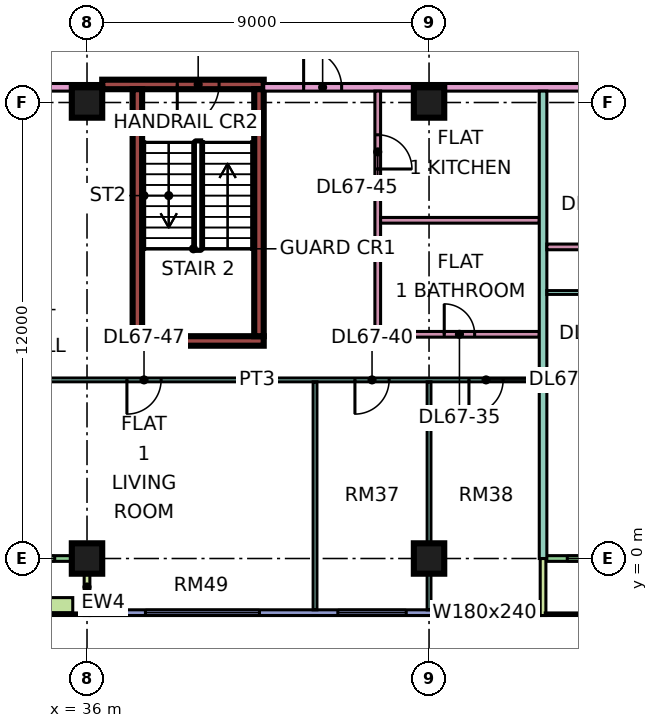
"""IFC4 building model, lengths in metres.
Left out: names, types, materials, properties, quantities, classifications, styles, units other than length and angle.
Written with IfcOpenShell. Run it as: python <this file> out.ifc"""

import sys

from ifc_helpers import new_model, si_unit, direction, frame, frame_2d, origin, origin_2d, place, context, subcontext, project, spatial, rectangle, extrude, element, fill, save


model = new_model("IFC4")
c1 = context("Model", 3, precision=1e-05, world=origin(), true_north=direction((0.0, 1.0)))
c2 = subcontext(c1, "Body", "Model", "MODEL_VIEW")
j1 = project(units=[si_unit("LENGTHUNIT", "METRE"), si_unit("PLANEANGLEUNIT", "RADIAN")], contexts=[c1])
p1 = place(None, origin())
s1 = spatial("IfcSite", under=j1, at=p1, CompositionType="ELEMENT")
p2 = place(p1, origin())
s2 = spatial("IfcBuilding", under=s1, at=p2, CompositionType="ELEMENT")
p3 = place(p2, frame((0.0, 0.0, 288.4)))
s3 = spatial("IfcBuildingStorey", under=s2, at=p3, CompositionType="ELEMENT", Elevation=288.4)
for number, where, z_axis, x_axis in (
    (1, (36.0, 0.0, 0.0), (0.0, 0.0, 1.0), (1.0, 0.0, 0.0)),
    (2, (36.0, 12.0, 0.0), (0.0, 0.0, 1.0), (1.0, 0.0, 0.0)),
    (3, (45.0, 0.0, 0.0), (0.0, 0.0, 1.0), (1.0, 0.0, 0.0)),
    (4, (45.0, 12.0, 0.0), (0.0, 0.0, 1.0), (1.0, 0.0, 0.0)),
):
    element("IfcColumn", number, at=place(p3, frame(where, z_axis=z_axis, x_axis=x_axis)), inside=s3, PredefinedType="COLUMN", context=c2, shape_type="SweptSolid", body=[
        extrude(rectangle(XDim=0.8, YDim=0.8, at=origin_2d()), origin(), (0.0, 0.0, 1.0), 3.75),
    ])
p4 = place(p3, frame((37.2, 5.725, 0.0), z_axis=(0.0, 0.0, 1.0), x_axis=(1.0, 0.0, 0.0)))
e5 = element("IfcWall", 5, at=p4, inside=s3, PredefinedType="SHEAR", context=c2, shape_type="SweptSolid", body=[
    extrude(rectangle(XDim=3.45, YDim=0.25, at=frame_2d((1.725, 0.0))), origin(), (0.0, 0.0, 1.0), 3.75),
])
p5 = place(p3, frame((36.4, 12.475, 0.0), z_axis=(0.0, 0.0, 1.0), x_axis=(1.0, 0.0, 0.0)))
e6 = element("IfcWall", 6, at=p5, inside=s3, PredefinedType="SHEAR", context=c2, shape_type="SweptSolid", body=[
    extrude(rectangle(XDim=4.25, YDim=0.25, at=frame_2d((2.125, 0.0))), origin(), (0.0, 0.0, 1.0), 3.75),
])
p6 = place(p5, frame((1.975, 0.0, 0.0)))
e7 = element("IfcOpeningElement", 7, at=p6, cuts=e6, PredefinedType="OPENING", context=c2, shape_type="SweptSolid", body=[
    extrude(rectangle(XDim=1.1, YDim=2.2, at=frame_2d((0.55, 1.1))), frame((0.0, 0.135, 0.0), z_axis=(0.0, -1.0, 0.0), x_axis=(1.0, 0.0, 0.0)), (0.0, 0.0, 1.0), 0.27),
])
for number, where, z_axis, x_axis in (
    (8, (37.325, 5.85, 0.0), (0.0, 0.0, 1.0), (0.0, 1.0, 0.0)),
    (9, (40.525, 5.85, 0.0), (0.0, 0.0, 1.0), (0.0, 1.0, 0.0)),
):
    element("IfcWall", number, at=place(p3, frame(where, z_axis=z_axis, x_axis=x_axis)), inside=s3, PredefinedType="SHEAR", context=c2, shape_type="SweptSolid", body=[
        extrude(rectangle(XDim=6.5, YDim=0.25, at=frame_2d((3.25, 0.0))), origin(), (0.0, 0.0, 1.0), 3.75),
    ])
p7 = place(p3, frame((24.075, 0.0, 0.0), z_axis=(0.0, 0.0, 1.0), x_axis=(1.0, 0.0, 0.0)))
e10 = element("IfcWall", 10, at=p7, inside=s3, PredefinedType="SOLIDWALL", context=c2, shape_type="SweptSolid", body=[
    extrude(rectangle(XDim=11.85, YDim=0.15, at=frame_2d((5.925, 0.0))), origin(), (0.0, 0.0, 1.0), 3.35),
])
p8 = place(p7, frame((0.775, 0.0, 0.45)))
e11 = element("IfcOpeningElement", 11, at=p8, cuts=e10, PredefinedType="OPENING", context=c2, shape_type="SweptSolid", body=[
    extrude(rectangle(XDim=1.8, YDim=2.4, at=frame_2d((0.9, 1.2))), frame((0.0, 0.085, 0.0), z_axis=(0.0, -1.0, 0.0), x_axis=(1.0, 0.0, 0.0)), (0.0, 0.0, 1.0), 0.17),
])
p9 = place(p7, frame((3.525, 0.0, 0.0)))
e12 = element("IfcOpeningElement", 12, at=p9, cuts=e10, PredefinedType="OPENING", context=c2, shape_type="SweptSolid", body=[
    extrude(rectangle(XDim=1.8, YDim=2.4, at=frame_2d((0.9, 1.2))), frame((0.0, 0.085, 0.0), z_axis=(0.0, -1.0, 0.0), x_axis=(1.0, 0.0, 0.0)), (0.0, 0.0, 1.0), 0.17),
])
p10 = place(p7, frame((6.525, 0.0, 0.45)))
e13 = element("IfcOpeningElement", 13, at=p10, cuts=e10, PredefinedType="OPENING", context=c2, shape_type="SweptSolid", body=[
    extrude(rectangle(XDim=1.8, YDim=2.4, at=frame_2d((0.9, 1.2))), frame((0.0, 0.085, 0.0), z_axis=(0.0, -1.0, 0.0), x_axis=(1.0, 0.0, 0.0)), (0.0, 0.0, 1.0), 0.17),
])
p11 = place(p7, frame((9.275, 0.0, 0.45)))
e14 = element("IfcOpeningElement", 14, at=p11, cuts=e10, PredefinedType="OPENING", context=c2, shape_type="SweptSolid", body=[
    extrude(rectangle(XDim=1.8, YDim=2.4, at=frame_2d((0.9, 1.2))), frame((0.0, 0.085, 0.0), z_axis=(0.0, -1.0, 0.0), x_axis=(1.0, 0.0, 0.0)), (0.0, 0.0, 1.0), 0.17),
])
p12 = place(p3, frame((36.0, -1.5, 0.0), z_axis=(0.0, 0.0, 1.0), x_axis=(0.0, 1.0, 0.0)))
e15 = element("IfcWall", 15, at=p12, inside=s3, PredefinedType="SOLIDWALL", context=c2, shape_type="SweptSolid", body=[
    extrude(rectangle(XDim=1.5, YDim=0.15, at=frame_2d((0.75, 0.0))), origin(), (0.0, 0.0, 1.0), 3.35),
])
p13 = place(p3, frame((36.075, -1.425, 0.0), z_axis=(0.0, 0.0, 1.0), x_axis=(1.0, 0.0, 0.0)))
e16 = element("IfcWall", 16, at=p13, inside=s3, PredefinedType="SOLIDWALL", context=c2, shape_type="SweptSolid", body=[
    extrude(rectangle(XDim=11.85, YDim=0.15, at=frame_2d((5.925, 0.0))), origin(), (0.0, 0.0, 1.0), 3.35),
])
p14 = place(p13, frame((1.462, 0.0, 0.45)))
e17 = element("IfcOpeningElement", 17, at=p14, cuts=e16, PredefinedType="OPENING", context=c2, shape_type="SweptSolid", body=[
    extrude(rectangle(XDim=3.0, YDim=2.4, at=frame_2d((1.5, 1.2))), frame((0.0, 0.085, 0.0), z_axis=(0.0, -1.0, 0.0), x_axis=(1.0, 0.0, 0.0)), (0.0, 0.0, 1.0), 0.17),
])
p15 = place(p13, frame((6.525, 0.0, 0.45)))
e18 = element("IfcOpeningElement", 18, at=p15, cuts=e16, PredefinedType="OPENING", context=c2, shape_type="SweptSolid", body=[
    extrude(rectangle(XDim=1.8, YDim=2.4, at=frame_2d((0.9, 1.2))), frame((0.0, 0.085, 0.0), z_axis=(0.0, -1.0, 0.0), x_axis=(1.0, 0.0, 0.0)), (0.0, 0.0, 1.0), 0.17),
])
p16 = place(p13, frame((9.488, 0.0, 0.45)))
e19 = element("IfcOpeningElement", 19, at=p16, cuts=e16, PredefinedType="OPENING", context=c2, shape_type="SweptSolid", body=[
    extrude(rectangle(XDim=1.8, YDim=2.4, at=frame_2d((0.9, 1.2))), frame((0.0, 0.085, 0.0), z_axis=(0.0, -1.0, 0.0), x_axis=(1.0, 0.0, 0.0)), (0.0, 0.0, 1.0), 0.17),
])
p17 = place(p3, frame((48.075, 0.0, 0.0), z_axis=(0.0, 0.0, 1.0), x_axis=(1.0, 0.0, 0.0)))
e20 = element("IfcWall", 20, at=p17, inside=s3, PredefinedType="SOLIDWALL", context=c2, shape_type="SweptSolid", body=[
    extrude(rectangle(XDim=13.35, YDim=0.15, at=frame_2d((6.675, 0.0))), origin(), (0.0, 0.0, 1.0), 3.35),
])
p18 = place(p17, frame((0.562, 0.0, 0.45)))
e21 = element("IfcOpeningElement", 21, at=p18, cuts=e20, PredefinedType="OPENING", context=c2, shape_type="SweptSolid", body=[
    extrude(rectangle(XDim=1.8, YDim=2.4, at=frame_2d((0.9, 1.2))), frame((0.0, 0.085, 0.0), z_axis=(0.0, -1.0, 0.0), x_axis=(1.0, 0.0, 0.0)), (0.0, 0.0, 1.0), 0.17),
])
p19 = place(p17, frame((3.275, 0.0, 0.45)))
e22 = element("IfcOpeningElement", 22, at=p19, cuts=e20, PredefinedType="OPENING", context=c2, shape_type="SweptSolid", body=[
    extrude(rectangle(XDim=1.8, YDim=2.4, at=frame_2d((0.9, 1.2))), frame((0.0, 0.085, 0.0), z_axis=(0.0, -1.0, 0.0), x_axis=(1.0, 0.0, 0.0)), (0.0, 0.0, 1.0), 0.17),
])
p20 = place(p17, frame((8.275, 0.0, 0.0)))
e23 = element("IfcOpeningElement", 23, at=p20, cuts=e20, PredefinedType="OPENING", context=c2, shape_type="SweptSolid", body=[
    extrude(rectangle(XDim=1.8, YDim=2.4, at=frame_2d((0.9, 1.2))), frame((0.0, 0.085, 0.0), z_axis=(0.0, -1.0, 0.0), x_axis=(1.0, 0.0, 0.0)), (0.0, 0.0, 1.0), 0.17),
])
p21 = place(p17, frame((12.188, 0.0, 0.45)))
e24 = element("IfcOpeningElement", 24, at=p21, cuts=e20, PredefinedType="OPENING", context=c2, shape_type="SweptSolid", body=[
    extrude(rectangle(XDim=0.9, YDim=2.4, at=frame_2d((0.45, 1.2))), frame((0.0, 0.085, 0.0), z_axis=(0.0, -1.0, 0.0), x_axis=(1.0, 0.0, 0.0)), (0.0, 0.0, 1.0), 0.17),
])
p22 = place(p3, frame((48.0, -1.5, 0.0), z_axis=(0.0, 0.0, 1.0), x_axis=(0.0, 1.0, 0.0)))
e25 = element("IfcWall", 25, at=p22, inside=s3, PredefinedType="SOLIDWALL", context=c2, shape_type="SweptSolid", body=[
    extrude(rectangle(XDim=1.5, YDim=0.15, at=frame_2d((0.75, 0.0))), origin(), (0.0, 0.0, 1.0), 3.35),
])
p23 = place(p3, frame((24.375, -1.229, 0.0), z_axis=(0.0, 0.0, 1.0), x_axis=(1.0, 0.0, 0.0)))
e26 = element("IfcWall", 26, at=p23, inside=s3, PredefinedType="SOLIDWALL", context=c2, shape_type="SweptSolid", body=[
    extrude(rectangle(XDim=11.25, YDim=0.4, at=frame_2d((5.625, 0.0))), origin(), (0.0, 0.0, 1.0), 0.7),
])
p24 = place(p3, frame((33.05, 4.7, 0.0), z_axis=(0.0, 0.0, 1.0), x_axis=(1.0, 0.0, 0.0)))
e27 = element("IfcWall", 27, at=p24, inside=s3, PredefinedType="PARTITIONING", context=c2, shape_type="SweptSolid", body=[
    extrude(rectangle(XDim=14.85, YDim=0.1, at=frame_2d((7.425, 0.0))), origin(), (0.0, 0.0, 1.0), 3.35),
])
p25 = place(p24, frame((10.0, 0.0, 0.0)))
e28 = element("IfcOpeningElement", 28, at=p25, cuts=e27, PredefinedType="OPENING", context=c2, shape_type="SweptSolid", body=[
    extrude(rectangle(XDim=0.9, YDim=2.1, at=frame_2d((0.45, 1.05))), frame((0.0, 0.06, 0.0), z_axis=(0.0, -1.0, 0.0), x_axis=(1.0, 0.0, 0.0)), (0.0, 0.0, 1.0), 0.12),
])
p26 = place(p24, frame((13.0, 0.0, 0.0)))
e29 = element("IfcOpeningElement", 29, at=p26, cuts=e27, PredefinedType="OPENING", context=c2, shape_type="SweptSolid", body=[
    extrude(rectangle(XDim=0.9, YDim=2.1, at=frame_2d((0.45, 1.05))), frame((0.0, 0.06, 0.0), z_axis=(0.0, -1.0, 0.0), x_axis=(1.0, 0.0, 0.0)), (0.0, 0.0, 1.0), 0.12),
])
p27 = place(p24, frame((4.0, 0.0, 0.0)))
e30 = element("IfcOpeningElement", 30, at=p27, cuts=e27, PredefinedType="OPENING", context=c2, shape_type="SweptSolid", body=[
    extrude(rectangle(XDim=0.9, YDim=2.1, at=frame_2d((0.45, 1.05))), frame((0.0, 0.06, 0.0), z_axis=(0.0, -1.0, 0.0), x_axis=(1.0, 0.0, 0.0)), (0.0, 0.0, 1.0), 0.12),
])
p28 = place(p3, frame((34.0, 12.4, 0.0), z_axis=(0.0, 0.0, 1.0), x_axis=(1.0, 0.0, 0.0)))
e31 = element("IfcWall", 31, at=p28, inside=s3, PredefinedType="PARTITIONING", context=c2, shape_type="SweptSolid", body=[
    extrude(rectangle(XDim=2.401, YDim=0.2, at=frame_2d((1.2, 0.0))), origin(), (0.0, 0.0, 1.0), 3.35),
])
p29 = place(p3, frame((40.65, 12.4, 0.0), z_axis=(0.0, 0.0, 1.0), x_axis=(1.0, 0.0, 0.0)))
e32 = element("IfcWall", 32, at=p29, inside=s3, PredefinedType="PARTITIONING", context=c2, shape_type="SweptSolid", body=[
    extrude(rectangle(XDim=22.35, YDim=0.2, at=frame_2d((11.175, 0.0))), origin(), (0.0, 0.0, 1.0), 3.35),
])
p30 = place(p29, frame((20.25, 0.0, 0.0)))
e33 = element("IfcOpeningElement", 33, at=p30, cuts=e32, PredefinedType="OPENING", context=c2, shape_type="SweptSolid", body=[
    extrude(rectangle(XDim=1.0, YDim=2.1, at=frame_2d((0.5, 1.05))), frame((0.0, 0.11, 0.0), z_axis=(0.0, -1.0, 0.0), x_axis=(1.0, 0.0, 0.0)), (0.0, 0.0, 1.0), 0.22),
])
p31 = place(p29, frame((1.05, 0.0, 0.0)))
e34 = element("IfcOpeningElement", 34, at=p31, cuts=e32, PredefinedType="OPENING", context=c2, shape_type="SweptSolid", body=[
    extrude(rectangle(XDim=1.0, YDim=2.1, at=frame_2d((0.5, 1.05))), frame((0.0, 0.11, 0.0), z_axis=(0.0, -1.0, 0.0), x_axis=(1.0, 0.0, 0.0)), (0.0, 0.0, 1.0), 0.22),
])
p32 = place(p3, frame((42.0, -1.35, 0.0), z_axis=(0.0, 0.0, 1.0), x_axis=(0.0, 1.0, 0.0)))
e35 = element("IfcWall", 35, at=p32, inside=s3, PredefinedType="PARTITIONING", context=c2, shape_type="SweptSolid", body=[
    extrude(rectangle(XDim=6.0, YDim=0.1, at=frame_2d((3.0, 0.0))), origin(), (0.0, 0.0, 1.0), 3.35),
])
p33 = place(p3, frame((43.65, 5.825, 0.0), z_axis=(0.0, 0.0, 1.0), x_axis=(0.0, 1.0, 0.0)))
e36 = element("IfcWall", 36, at=p33, inside=s3, PredefinedType="PARTITIONING", context=c2, shape_type="SweptSolid", body=[
    extrude(rectangle(XDim=6.475, YDim=0.15, at=frame_2d((3.238, 0.0))), origin(), (0.0, 0.0, 1.0), 3.35),
])
p34 = place(p33, frame((4.425, 0.0, 0.0)))
e37 = element("IfcOpeningElement", 37, at=p34, cuts=e36, PredefinedType="OPENING", context=c2, shape_type="SweptSolid", body=[
    extrude(rectangle(XDim=0.9, YDim=2.1, at=frame_2d((0.45, 1.05))), frame((0.0, 0.085, 0.0), z_axis=(0.0, -1.0, 0.0), x_axis=(1.0, 0.0, 0.0)), (0.0, 0.0, 1.0), 0.17),
])
p35 = place(p3, frame((43.725, 5.9, 0.0), z_axis=(0.0, 0.0, 1.0), x_axis=(1.0, 0.0, 0.0)))
e38 = element("IfcWall", 38, at=p35, inside=s3, PredefinedType="PARTITIONING", context=c2, shape_type="SweptSolid", body=[
    extrude(rectangle(XDim=4.175, YDim=0.15, at=frame_2d((2.087, 0.0))), origin(), (0.0, 0.0, 1.0), 3.35),
])
p36 = place(p35, frame((1.675, 0.0, 0.0)))
e39 = element("IfcOpeningElement", 39, at=p36, cuts=e38, PredefinedType="OPENING", context=c2, shape_type="SweptSolid", body=[
    extrude(rectangle(XDim=0.8, YDim=2.1, at=frame_2d((0.4, 1.05))), frame((0.0, 0.085, 0.0), z_axis=(0.0, -1.0, 0.0), x_axis=(1.0, 0.0, 0.0)), (0.0, 0.0, 1.0), 0.17),
])
p37 = place(p3, frame((43.725, 8.9, 0.0), z_axis=(0.0, 0.0, 1.0), x_axis=(1.0, 0.0, 0.0)))
e40 = element("IfcWall", 40, at=p37, inside=s3, PredefinedType="PARTITIONING", context=c2, shape_type="SweptSolid", body=[
    extrude(rectangle(XDim=4.175, YDim=0.15, at=frame_2d((2.087, 0.0))), origin(), (0.0, 0.0, 1.0), 3.35),
])
p38 = place(p3, frame((45.0, -1.351, 0.0), z_axis=(0.0, 0.0, 1.0), x_axis=(0.0, 1.0, 0.0)))
e41 = element("IfcWall", 41, at=p38, inside=s3, PredefinedType="PARTITIONING", context=c2, shape_type="SweptSolid", body=[
    extrude(rectangle(XDim=6.001, YDim=0.1, at=frame_2d((3.0, 0.0))), origin(), (0.0, 0.0, 1.0), 3.35),
])
p39 = place(p3, frame((48.0, 0.0, 0.0), z_axis=(0.0, 0.0, 1.0), x_axis=(0.0, 1.0, 0.0)))
e42 = element("IfcWall", 42, at=p39, inside=s3, PredefinedType="PARTITIONING", context=c2, shape_type="SweptSolid", body=[
    extrude(rectangle(XDim=12.3, YDim=0.2, at=frame_2d((6.15, 0.0))), origin(), (0.0, 0.0, 1.0), 3.35),
])
p40 = place(p3, frame((48.1, 7.0, 0.0), z_axis=(0.0, 0.0, 1.0), x_axis=(1.0, 0.0, 0.0)))
e43 = element("IfcWall", 43, at=p40, inside=s3, PredefinedType="PARTITIONING", context=c2, shape_type="SweptSolid", body=[
    extrude(rectangle(XDim=5.85, YDim=0.1, at=frame_2d((2.925, 0.0))), origin(), (0.0, 0.0, 1.0), 3.35),
])
p41 = place(p40, frame((0.95, 0.0, 0.0)))
e44 = element("IfcOpeningElement", 44, at=p41, cuts=e43, PredefinedType="OPENING", context=c2, shape_type="SweptSolid", body=[
    extrude(rectangle(XDim=0.9, YDim=2.1, at=frame_2d((0.45, 1.05))), frame((0.0, 0.06, 0.0), z_axis=(0.0, -1.0, 0.0), x_axis=(1.0, 0.0, 0.0)), (0.0, 0.0, 1.0), 0.12),
])
p42 = place(p40, frame((3.95, 0.0, 0.0)))
e45 = element("IfcOpeningElement", 45, at=p42, cuts=e43, PredefinedType="OPENING", context=c2, shape_type="SweptSolid", body=[
    extrude(rectangle(XDim=0.9, YDim=2.1, at=frame_2d((0.45, 1.05))), frame((0.0, 0.06, 0.0), z_axis=(0.0, -1.0, 0.0), x_axis=(1.0, 0.0, 0.0)), (0.0, 0.0, 1.0), 0.12),
])
p43 = place(p3, frame((48.1, 8.2, 0.0), z_axis=(0.0, 0.0, 1.0), x_axis=(1.0, 0.0, 0.0)))
e46 = element("IfcWall", 46, at=p43, inside=s3, PredefinedType="PARTITIONING", context=c2, shape_type="SweptSolid", body=[
    extrude(rectangle(XDim=11.675, YDim=0.15, at=frame_2d((5.837, 0.0))), origin(), (0.0, 0.0, 1.0), 3.35),
])
p44 = place(p43, frame((9.75, 0.0, 0.0)))
e47 = element("IfcOpeningElement", 47, at=p44, cuts=e46, PredefinedType="OPENING", context=c2, shape_type="SweptSolid", body=[
    extrude(rectangle(XDim=0.8, YDim=2.1, at=frame_2d((0.4, 1.05))), frame((0.0, 0.085, 0.0), z_axis=(0.0, -1.0, 0.0), x_axis=(1.0, 0.0, 0.0)), (0.0, 0.0, 1.0), 0.17),
])
p45 = place(p43, frame((5.3, 0.0, 0.0)))
e48 = element("IfcOpeningElement", 48, at=p45, cuts=e46, PredefinedType="OPENING", context=c2, shape_type="SweptSolid", body=[
    extrude(rectangle(XDim=0.9, YDim=2.1, at=frame_2d((0.45, 1.05))), frame((0.0, 0.085, 0.0), z_axis=(0.0, -1.0, 0.0), x_axis=(1.0, 0.0, 0.0)), (0.0, 0.0, 1.0), 0.17),
])
p46 = place(p43, frame((1.05, 0.0, 0.0)))
e49 = element("IfcOpeningElement", 49, at=p46, cuts=e46, PredefinedType="OPENING", context=c2, shape_type="SweptSolid", body=[
    extrude(rectangle(XDim=0.8, YDim=2.1, at=frame_2d((0.4, 1.05))), frame((0.0, 0.085, 0.0), z_axis=(0.0, -1.0, 0.0), x_axis=(1.0, 0.0, 0.0)), (0.0, 0.0, 1.0), 0.17),
])
p47 = place(p11, origin())
e50 = element("IfcWindow", 50, at=p47, inside=s3, PartitioningType="SINGLE_PANEL", PredefinedType="WINDOW", context=c2, shape_type="SweptSolid", body=[
    extrude(rectangle(XDim=1.8, YDim=2.4, at=frame_2d((0.9, 1.2))), frame((0.0, 0.03, 0.0), z_axis=(0.0, -1.0, 0.0), x_axis=(1.0, 0.0, 0.0)), (0.0, 0.0, 1.0), 0.06),
])
fill(e14, e50)
p48 = place(p14, origin())
e51 = element("IfcWindow", 51, at=p48, inside=s3, PartitioningType="SINGLE_PANEL", PredefinedType="WINDOW", context=c2, shape_type="SweptSolid", body=[
    extrude(rectangle(XDim=3.0, YDim=2.4, at=frame_2d((1.5, 1.2))), frame((0.0, 0.03, 0.0), z_axis=(0.0, -1.0, 0.0), x_axis=(1.0, 0.0, 0.0)), (0.0, 0.0, 1.0), 0.06),
])
fill(e17, e51)
p49 = place(p15, origin())
e52 = element("IfcWindow", 52, at=p49, inside=s3, PartitioningType="SINGLE_PANEL", PredefinedType="WINDOW", context=c2, shape_type="SweptSolid", body=[
    extrude(rectangle(XDim=1.8, YDim=2.4, at=frame_2d((0.9, 1.2))), frame((0.0, 0.03, 0.0), z_axis=(0.0, -1.0, 0.0), x_axis=(1.0, 0.0, 0.0)), (0.0, 0.0, 1.0), 0.06),
])
fill(e18, e52)
p50 = place(p16, origin())
e53 = element("IfcWindow", 53, at=p50, inside=s3, PartitioningType="SINGLE_PANEL", PredefinedType="WINDOW", context=c2, shape_type="SweptSolid", body=[
    extrude(rectangle(XDim=1.8, YDim=2.4, at=frame_2d((0.9, 1.2))), frame((0.0, 0.03, 0.0), z_axis=(0.0, -1.0, 0.0), x_axis=(1.0, 0.0, 0.0)), (0.0, 0.0, 1.0), 0.06),
])
fill(e19, e53)
p51 = place(p18, origin())
e54 = element("IfcWindow", 54, at=p51, inside=s3, PartitioningType="SINGLE_PANEL", PredefinedType="WINDOW", context=c2, shape_type="SweptSolid", body=[
    extrude(rectangle(XDim=1.8, YDim=2.4, at=frame_2d((0.9, 1.2))), frame((0.0, 0.03, 0.0), z_axis=(0.0, -1.0, 0.0), x_axis=(1.0, 0.0, 0.0)), (0.0, 0.0, 1.0), 0.06),
])
fill(e21, e54)
p52 = place(p6, frame((1.1, 0.0, 0.0), z_axis=(0.0, 0.0, 1.0), x_axis=(-1.0, 0.0, 0.0)))
e55 = element("IfcDoor", 55, at=p52, inside=s3, OperationType="SINGLE_SWING_LEFT", PredefinedType="DOOR", context=c2, shape_type="SweptSolid", body=[
    extrude(rectangle(XDim=1.1, YDim=2.2, at=frame_2d((0.55, 1.1))), frame((0.0, 0.025, 0.0), z_axis=(0.0, -1.0, 0.0), x_axis=(1.0, 0.0, 0.0)), (0.0, 0.0, 1.0), 0.05),
])
fill(e7, e55)
p53 = place(p36, origin())
e56 = element("IfcDoor", 56, at=p53, inside=s3, OperationType="SINGLE_SWING_LEFT", PredefinedType="DOOR", context=c2, shape_type="SweptSolid", body=[
    extrude(rectangle(XDim=0.8, YDim=2.1, at=frame_2d((0.4, 1.05))), frame((0.0, 0.025, 0.0), z_axis=(0.0, -1.0, 0.0), x_axis=(1.0, 0.0, 0.0)), (0.0, 0.0, 1.0), 0.05),
])
fill(e39, e56)
p54 = place(p25, frame((0.9, 0.0, 0.0), z_axis=(0.0, 0.0, 1.0), x_axis=(-1.0, 0.0, 0.0)))
e57 = element("IfcDoor", 57, at=p54, inside=s3, OperationType="SINGLE_SWING_LEFT", PredefinedType="DOOR", context=c2, shape_type="SweptSolid", body=[
    extrude(rectangle(XDim=0.9, YDim=2.1, at=frame_2d((0.45, 1.05))), frame((0.0, 0.025, 0.0), z_axis=(0.0, -1.0, 0.0), x_axis=(1.0, 0.0, 0.0)), (0.0, 0.0, 1.0), 0.05),
])
fill(e28, e57)
p55 = place(p26, frame((0.9, 0.0, 0.0), z_axis=(0.0, 0.0, 1.0), x_axis=(-1.0, 0.0, 0.0)))
e58 = element("IfcDoor", 58, at=p55, inside=s3, OperationType="SINGLE_SWING_LEFT", PredefinedType="DOOR", context=c2, shape_type="SweptSolid", body=[
    extrude(rectangle(XDim=0.9, YDim=2.1, at=frame_2d((0.45, 1.05))), frame((0.0, 0.025, 0.0), z_axis=(0.0, -1.0, 0.0), x_axis=(1.0, 0.0, 0.0)), (0.0, 0.0, 1.0), 0.05),
])
fill(e29, e58)
p56 = place(p31, origin())
e59 = element("IfcDoor", 59, at=p56, inside=s3, OperationType="SINGLE_SWING_LEFT", PredefinedType="DOOR", context=c2, shape_type="SweptSolid", body=[
    extrude(rectangle(XDim=1.0, YDim=2.1, at=frame_2d((0.5, 1.05))), frame((0.0, 0.025, 0.0), z_axis=(0.0, -1.0, 0.0), x_axis=(1.0, 0.0, 0.0)), (0.0, 0.0, 1.0), 0.05),
])
fill(e34, e59)
p57 = place(p34, frame((0.9, 0.0, 0.0), z_axis=(0.0, 0.0, 1.0), x_axis=(-1.0, 0.0, 0.0)))
e60 = element("IfcDoor", 60, at=p57, inside=s3, OperationType="SINGLE_SWING_LEFT", PredefinedType="DOOR", context=c2, shape_type="SweptSolid", body=[
    extrude(rectangle(XDim=0.9, YDim=2.1, at=frame_2d((0.45, 1.05))), frame((0.0, 0.025, 0.0), z_axis=(0.0, -1.0, 0.0), x_axis=(1.0, 0.0, 0.0)), (0.0, 0.0, 1.0), 0.05),
])
fill(e37, e60)
p58 = place(p27, frame((0.9, 0.0, 0.0), z_axis=(0.0, 0.0, 1.0), x_axis=(-1.0, 0.0, 0.0)))
e61 = element("IfcDoor", 61, at=p58, inside=s3, OperationType="SINGLE_SWING_LEFT", PredefinedType="DOOR", context=c2, shape_type="SweptSolid", body=[
    extrude(rectangle(XDim=0.9, YDim=2.1, at=frame_2d((0.45, 1.05))), frame((0.0, 0.025, 0.0), z_axis=(0.0, -1.0, 0.0), x_axis=(1.0, 0.0, 0.0)), (0.0, 0.0, 1.0), 0.05),
])
fill(e30, e61)
save(model, sys.argv[1])
